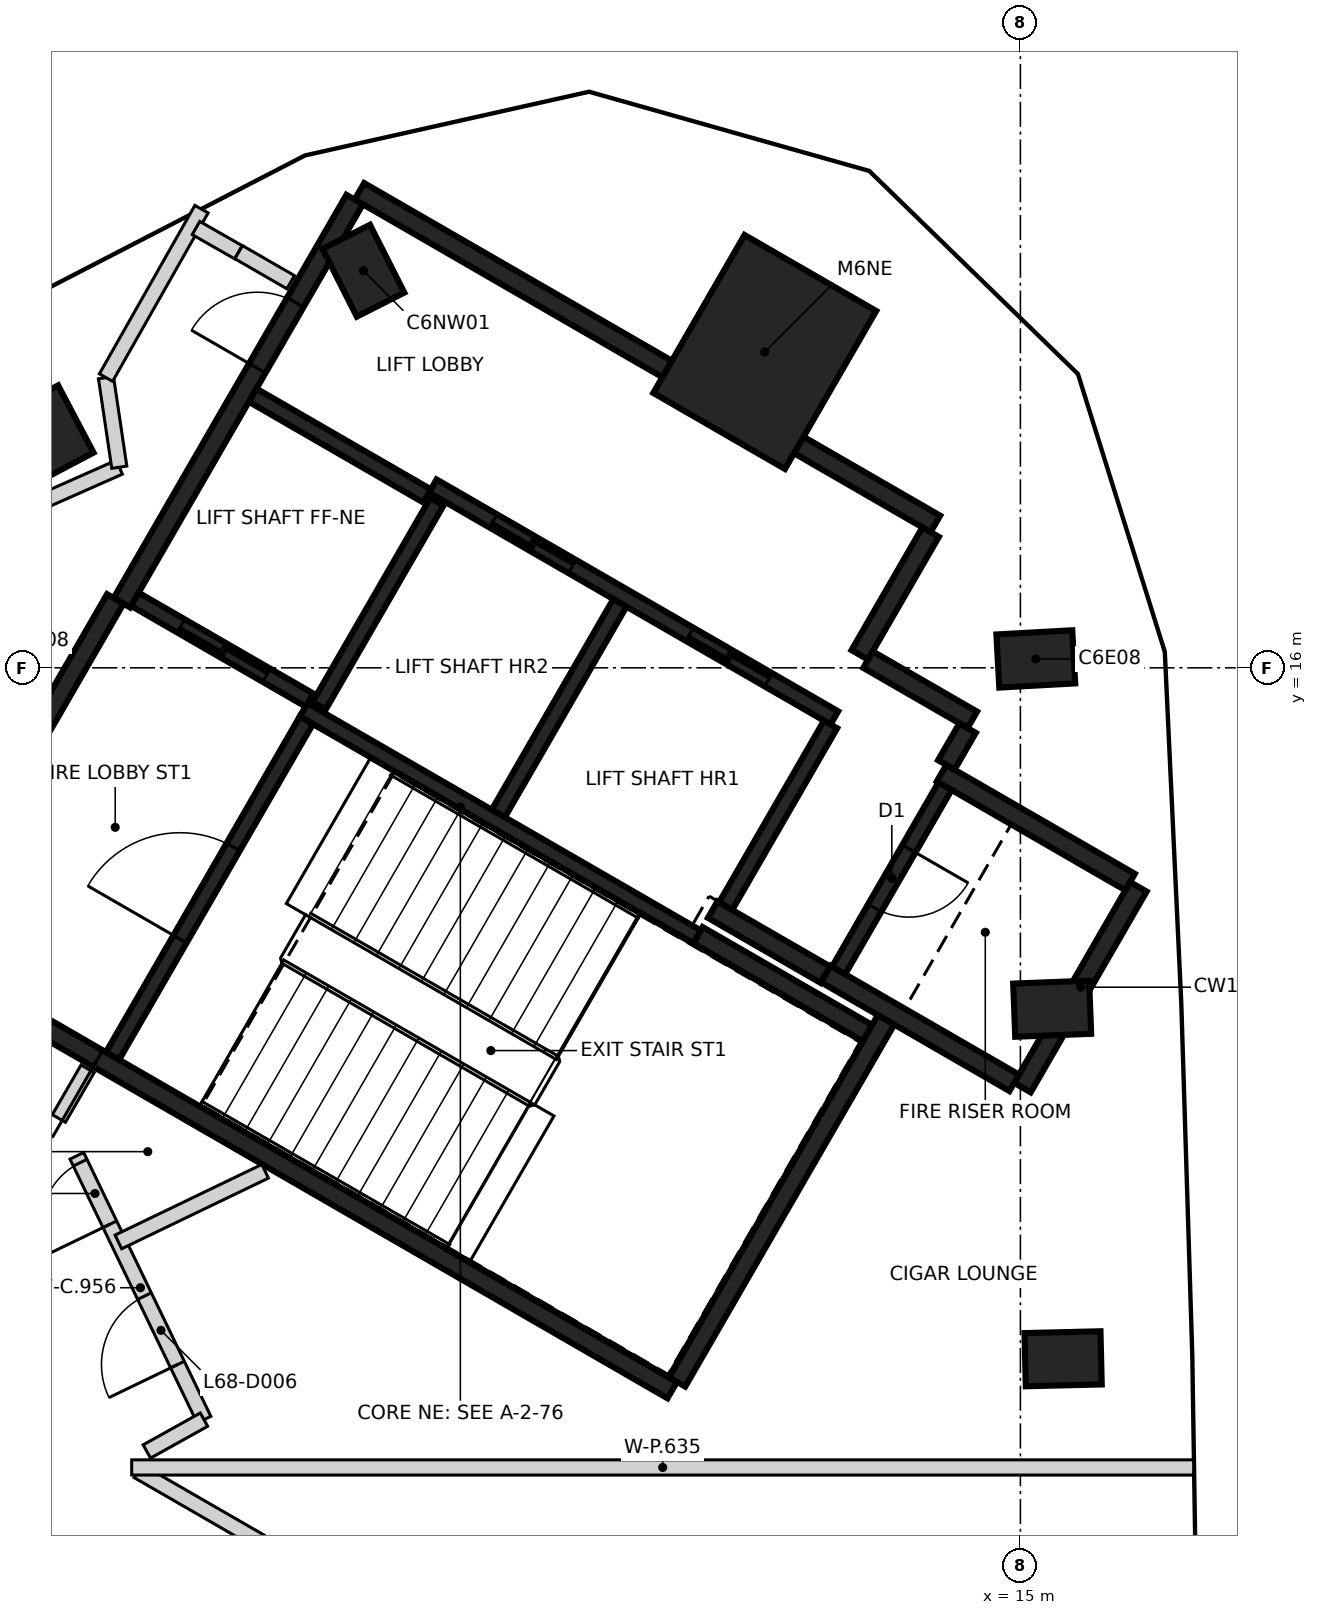
"""IFC4 building model, lengths in metres.
Left out: names, types, materials, properties, quantities, classifications, styles, units other than length and angle.
Written with IfcOpenShell. Run it as: python <this file> out.ifc"""

import sys

from ifc_helpers import new_model, si_unit, direction, frame, frame_2d, origin, origin_2d, place, context, subcontext, project, spatial, rectangle, extrude, element, fill, save


model = new_model("IFC4")
c1 = context("Model", 3, precision=1e-05, world=origin(), true_north=direction((0.0, 1.0)))
c2 = subcontext(c1, "Body", "Model", "MODEL_VIEW")
j1 = project(units=[si_unit("LENGTHUNIT", "METRE"), si_unit("PLANEANGLEUNIT", "RADIAN")], contexts=[c1])
p1 = place(None, origin())
s1 = spatial("IfcSite", under=j1, at=p1, CompositionType="ELEMENT")
p2 = place(p1, origin())
s2 = spatial("IfcBuilding", under=s1, at=p2, CompositionType="ELEMENT")
p3 = place(p2, frame((0.0, 0.0, 269.4)))
s3 = spatial("IfcBuildingStorey", under=s2, at=p3, CompositionType="ELEMENT", Elevation=269.4)
for number, where, z_axis, x_axis in (
    (1, (15.562, 6.91, -0.35), (0.0, 0.0, 1.0), (1.0, 0.024, 0.0)),
    (2, (15.418, 11.515, -0.35), (0.0, 0.0, 1.0), (0.999, 0.039, 0.0)),
    (3, (15.202, 16.117, -0.35), (0.0, 0.0, 1.0), (0.998, 0.055, 0.0)),
    (4, (6.356, 21.224, -0.35), (0.0, 0.0, 1.0), (-0.452, 0.892, 0.0)),
    (5, (2.263, 19.11, -0.35), (0.0, 0.0, 1.0), (-0.466, 0.885, 0.0)),
):
    element("IfcColumn", number, at=place(p3, frame(where, z_axis=z_axis, x_axis=x_axis)), inside=s3, PredefinedType="COLUMN", context=c2, shape_type="SweptSolid", body=[
        extrude(rectangle(XDim=1.0, YDim=0.7, at=origin_2d()), origin(), (0.0, 0.0, 1.0), 3.6),
    ])
p4 = place(p3, frame((11.637, 20.155, -0.35), z_axis=(0.0, 0.0, 1.0), x_axis=(0.5, 0.866025403784, 0.0)))
e6 = element("IfcColumn", 6, at=p4, inside=s3, PredefinedType="COLUMN", context=c2, shape_type="SweptSolid", body=[
    extrude(rectangle(XDim=2.4, YDim=2.0, at=origin_2d()), origin(), (0.0, 0.0, 1.0), 3.6),
])
p5 = place(p3, frame((10.42, 6.498, 0.0), z_axis=(0.0, 0.0, 1.0), x_axis=(-0.866021906294, 0.500006057782, 0.0)))
e7 = element("IfcWall", 7, at=p5, inside=s3, PredefinedType="SHEAR", context=c2, shape_type="SweptSolid", body=[
    extrude(rectangle(XDim=11.55, YDim=0.25, at=frame_2d((5.775, 0.0))), origin(), (0.0, 0.0, 1.0), 3.25),
])
p6 = place(p5, frame((10.025, 0.0, 0.0)))
e8 = element("IfcOpeningElement", 8, at=p6, cuts=e7, PredefinedType="OPENING", context=c2, shape_type="SweptSolid", body=[
    extrude(rectangle(XDim=1.2, YDim=2.1, at=frame_2d((0.6, 1.05))), frame((0.0, 0.135, 0.0), z_axis=(0.0, -1.0, 0.0), x_axis=(1.0, 0.0, 0.0)), (0.0, 0.0, 1.0), 0.27),
])
p7 = place(p5, frame((8.725, 0.0, 0.0)))
e9 = element("IfcOpeningElement", 9, at=p7, cuts=e7, PredefinedType="OPENING", context=c2, shape_type="SweptSolid", body=[
    extrude(rectangle(XDim=1.2, YDim=2.1, at=frame_2d((0.6, 1.05))), frame((0.0, 0.135, 0.0), z_axis=(0.0, -1.0, 0.0), x_axis=(1.0, 0.0, 0.0)), (0.0, 0.0, 1.0), 0.27),
])
p8 = place(p3, frame((6.304, 22.269, 0.0), z_axis=(0.0, 0.0, 1.0), x_axis=(0.866022959057, -0.500004234368, 0.0)))
e10 = element("IfcWall", 10, at=p8, inside=s3, PredefinedType="SHEAR", context=c2, shape_type="SweptSolid", body=[
    extrude(rectangle(XDim=8.75, YDim=0.25, at=frame_2d((4.375, 0.0))), origin(), (0.0, 0.0, 1.0), 3.25),
])
p9 = place(p3, frame((3.179, 16.856, 0.0), z_axis=(0.0, 0.0, 1.0), x_axis=(0.500001955336, 0.866024274868, 0.0)))
e11 = element("IfcWall", 11, at=p9, inside=s3, PredefinedType="SHEAR", context=c2, shape_type="SweptSolid", body=[
    extrude(rectangle(XDim=6.125, YDim=0.25, at=frame_2d((3.062, 0.0))), origin(), (0.0, 0.0, 1.0), 3.25),
])
p10 = place(p9, frame((3.563, 0.0, 0.0)))
e12 = element("IfcOpeningElement", 12, at=p10, cuts=e11, PredefinedType="OPENING", context=c2, shape_type="SweptSolid", body=[
    extrude(rectangle(XDim=1.0, YDim=2.1, at=frame_2d((0.5, 1.05))), frame((0.0, 0.135, 0.0), z_axis=(0.0, -1.0, 0.0), x_axis=(1.0, 0.0, 0.0)), (0.0, 0.0, 1.0), 0.27),
])
p11 = place(p3, frame((0.48, 12.381, 0.0), z_axis=(0.0, 0.0, 1.0), x_axis=(0.49999885962, 0.866026062182, 0.0)))
e13 = element("IfcWall", 13, at=p11, inside=s3, PredefinedType="SHEAR", context=c2, shape_type="SweptSolid", body=[
    extrude(rectangle(XDim=5.225, YDim=0.25, at=frame_2d((2.612, 0.0))), origin(), (0.0, 0.0, 1.0), 3.25),
])
p12 = place(p3, frame((13.238, 11.378, 0.0), z_axis=(0.0, 0.0, 1.0), x_axis=(-0.500008851346, -0.866020293397, 0.0)))
e14 = element("IfcWall", 14, at=p12, inside=s3, PredefinedType="SHEAR", context=c2, shape_type="SweptSolid", body=[
    extrude(rectangle(XDim=5.51, YDim=0.25, at=frame_2d((2.755, 0.0))), origin(), (0.0, 0.0, 1.0), 3.25),
])
p13 = place(p3, frame((16.552, 13.119, 0.0), z_axis=(0.0, 0.0, 1.0), x_axis=(-0.499978833458, -0.866037623948, 0.0)))
e15 = element("IfcWall", 15, at=p13, inside=s3, PredefinedType="SHEAR", context=c2, shape_type="SweptSolid", body=[
    extrude(rectangle(XDim=3.05, YDim=0.25, at=frame_2d((1.525, 0.0))), origin(), (0.0, 0.0, 1.0), 3.25),
])
p14 = place(p3, frame((14.918, 10.54, 0.0), z_axis=(0.0, 0.0, 1.0), x_axis=(-0.866063538972, 0.499933942099, 0.0)))
e16 = element("IfcWall", 16, at=p14, inside=s3, PredefinedType="SHEAR", context=c2, shape_type="SweptSolid", body=[
    extrude(rectangle(XDim=2.865, YDim=0.25, at=frame_2d((1.432, 0.0))), origin(), (0.0, 0.0, 1.0), 3.25),
])
p15 = place(p3, frame((13.963, 14.614, 0.0), z_axis=(0.0, 0.0, 1.0), x_axis=(0.866042235819, -0.499970844928, 0.0)))
e17 = element("IfcWall", 17, at=p15, inside=s3, PredefinedType="SHEAR", context=c2, shape_type="SweptSolid", body=[
    extrude(rectangle(XDim=2.865, YDim=0.25, at=frame_2d((1.432, 0.0))), origin(), (0.0, 0.0, 1.0), 3.25),
])
p16 = place(p3, frame((10.757, 12.481, 0.0), z_axis=(0.0, 0.0, 1.0), x_axis=(0.866022940537, -0.500004266446, 0.0)))
e18 = element("IfcWall", 18, at=p16, inside=s3, PredefinedType="SHEAR", context=c2, shape_type="SweptSolid", body=[
    extrude(rectangle(XDim=2.575, YDim=0.25, at=frame_2d((1.287, 0.0))), origin(), (0.0, 0.0, 1.0), 3.25),
])
p17 = place(p3, frame((13.819, 17.785, 0.0), z_axis=(0.0, 0.0, 1.0), x_axis=(-0.500039802285, -0.866002422705, 0.0)))
e19 = element("IfcWall", 19, at=p17, inside=s3, PredefinedType="SHEAR", context=c2, shape_type="SweptSolid", body=[
    extrude(rectangle(XDim=1.865, YDim=0.25, at=frame_2d((0.932, 0.0))), origin(), (0.0, 0.0, 1.0), 3.25),
])
p18 = place(p3, frame((12.433, 11.964, 0.0), z_axis=(0.0, 0.0, 1.0), x_axis=(-0.866038183914, 0.499977863513, 0.0)))
e20 = element("IfcWall", 20, at=p18, inside=s3, PredefinedType="SHEAR", context=c2, shape_type="SweptSolid", body=[
    extrude(rectangle(XDim=1.71, YDim=0.25, at=frame_2d((0.855, 0.0))), origin(), (0.0, 0.0, 1.0), 3.25),
])
p19 = place(p3, frame((12.995, 16.108, 0.0), z_axis=(0.0, 0.0, 1.0), x_axis=(0.866044474677, -0.49996696679, 0.0)))
e21 = element("IfcWall", 21, at=p19, inside=s3, PredefinedType="SHEAR", context=c2, shape_type="SweptSolid", body=[
    extrude(rectangle(XDim=1.584, YDim=0.25, at=frame_2d((0.792, 0.0))), origin(), (0.0, 0.0, 1.0), 3.25),
])
p20 = place(p3, frame((14.305, 15.207, 0.0), z_axis=(0.0, 0.0, 1.0), x_axis=(-0.499848422343, -0.866112899501, 0.0)))
e22 = element("IfcWall", 22, at=p20, inside=s3, PredefinedType="SHEAR", context=c2, shape_type="SweptSolid", body=[
    extrude(rectangle(XDim=0.559, YDim=0.25, at=frame_2d((0.28, 0.0))), origin(), (0.0, 0.0, 1.0), 3.25),
])
p21 = place(p3, frame((12.552, 15.342, 0.0), z_axis=(0.0, 0.0, 1.0), x_axis=(-0.866030299012, 0.499991521122, 0.0)))
e23 = element("IfcWall", 23, at=p21, inside=s3, PredefinedType="SHEAR", context=c2, shape_type="SweptSolid", body=[
    extrude(rectangle(XDim=6.1, YDim=0.2, at=frame_2d((3.05, 0.0))), origin(), (0.0, 0.0, 1.0), 3.25),
])
p22 = place(p21, frame((1.0, 0.0, 0.0)))
e24 = element("IfcOpeningElement", 24, at=p22, cuts=e23, PredefinedType="OPENING", context=c2, shape_type="SweptSolid", body=[
    extrude(rectangle(XDim=1.2, YDim=2.1, at=frame_2d((0.6, 1.05))), frame((0.0, 0.11, 0.0), z_axis=(0.0, -1.0, 0.0), x_axis=(1.0, 0.0, 0.0)), (0.0, 0.0, 1.0), 0.22),
])
p23 = place(p21, frame((3.982, 0.0, 0.0)))
e25 = element("IfcOpeningElement", 25, at=p23, cuts=e23, PredefinedType="OPENING", context=c2, shape_type="SweptSolid", body=[
    extrude(rectangle(XDim=1.2, YDim=2.1, at=frame_2d((0.6, 1.05))), frame((0.0, 0.11, 0.0), z_axis=(0.0, -1.0, 0.0), x_axis=(1.0, 0.0, 0.0)), (0.0, 0.0, 1.0), 0.22),
])
p24 = place(p3, frame((10.743, 12.46, 0.0), z_axis=(0.0, 0.0, 1.0), x_axis=(-0.866018848283, 0.500011354289, 0.0)))
e26 = element("IfcWall", 26, at=p24, inside=s3, PredefinedType="SHEAR", context=c2, shape_type="SweptSolid", body=[
    extrude(rectangle(XDim=5.974, YDim=0.2, at=frame_2d((2.987, 0.0))), origin(), (0.0, 0.0, 1.0), 3.25),
])
p25 = place(p3, frame((3.057, 10.895, 0.0), z_axis=(0.0, 0.0, 1.0), x_axis=(0.500027839223, 0.866009330205, 0.0)))
e27 = element("IfcWall", 27, at=p25, inside=s3, PredefinedType="SHEAR", context=c2, shape_type="SweptSolid", body=[
    extrude(rectangle(XDim=5.098, YDim=0.2, at=frame_2d((2.549, 0.0))), origin(), (0.0, 0.0, 1.0), 3.25),
])
p26 = place(p25, frame((1.774, 0.0, 0.0)))
e28 = element("IfcOpeningElement", 28, at=p26, cuts=e27, PredefinedType="OPENING", context=c2, shape_type="SweptSolid", body=[
    extrude(rectangle(XDim=1.4, YDim=2.1, at=frame_2d((0.7, 1.05))), frame((0.0, 0.11, 0.0), z_axis=(0.0, -1.0, 0.0), x_axis=(1.0, 0.0, 0.0)), (0.0, 0.0, 1.0), 0.22),
])
p27 = place(p3, frame((8.132, 14.084, 0.0), z_axis=(0.0, 0.0, 1.0), x_axis=(0.500030834389, 0.86600760081, 0.0)))
e29 = element("IfcWall", 29, at=p27, inside=s3, PredefinedType="SHEAR", context=c2, shape_type="SweptSolid", body=[
    extrude(rectangle(XDim=3.198, YDim=0.2, at=frame_2d((1.599, 0.0))), origin(), (0.0, 0.0, 1.0), 3.25),
])
p28 = place(p3, frame((14.008, 14.442, 0.0), z_axis=(0.0, 0.0, 1.0), x_axis=(-0.499986818241, -0.866033014143, 0.0)))
e30 = element("IfcWall", 30, at=p28, inside=s3, PredefinedType="SHEAR", context=c2, shape_type="SweptSolid", body=[
    extrude(rectangle(XDim=2.798, YDim=0.2, at=frame_2d((1.399, 0.0))), origin(), (0.0, 0.0, 1.0), 3.25),
])
p29 = place(p28, frame((0.949, 0.0, 0.0)))
e31 = element("IfcOpeningElement", 31, at=p29, cuts=e30, PredefinedType="OPENING", context=c2, shape_type="SweptSolid", body=[
    extrude(rectangle(XDim=0.9, YDim=2.1, at=frame_2d((0.45, 1.05))), frame((0.0, 0.11, 0.0), z_axis=(0.0, -1.0, 0.0), x_axis=(1.0, 0.0, 0.0)), (0.0, 0.0, 1.0), 0.22),
])
p30 = place(p3, frame((12.502, 15.255, 0.0), z_axis=(0.0, 0.0, 1.0), x_axis=(-0.499965018551, -0.866045599391, 0.0)))
e32 = element("IfcWall", 32, at=p30, inside=s3, PredefinedType="SHEAR", context=c2, shape_type="SweptSolid", body=[
    extrude(rectangle(XDim=2.759, YDim=0.2, at=frame_2d((1.379, 0.0))), origin(), (0.0, 0.0, 1.0), 3.25),
])
p31 = place(p3, frame((7.324, 18.187, 0.0), z_axis=(0.0, 0.0, 1.0), x_axis=(-0.499967891604, -0.866043940782, 0.0)))
e33 = element("IfcWall", 33, at=p31, inside=s3, PredefinedType="SHEAR", context=c2, shape_type="SweptSolid", body=[
    extrude(rectangle(XDim=3.1, YDim=0.2, at=frame_2d((1.55, 0.0))), origin(), (0.0, 0.0, 1.0), 3.25),
])
p32 = place(p3, frame((5.646, 15.576, 0.0), z_axis=(0.0, 0.0, 1.0), x_axis=(-0.866018407898, 0.500012117035, 0.0)))
e34 = element("IfcWall", 34, at=p32, inside=s3, PredefinedType="SHEAR", context=c2, shape_type="SweptSolid", body=[
    extrude(rectangle(XDim=2.651, YDim=0.2, at=frame_2d((1.325, 0.0))), origin(), (0.0, 0.0, 1.0), 3.25),
])
p33 = place(p32, frame((0.652, 0.0, 0.0)))
e35 = element("IfcOpeningElement", 35, at=p33, cuts=e34, PredefinedType="OPENING", context=c2, shape_type="SweptSolid", body=[
    extrude(rectangle(XDim=1.3, YDim=2.1, at=frame_2d((0.65, 1.05))), frame((0.0, 0.11, 0.0), z_axis=(0.0, -1.0, 0.0), x_axis=(1.0, 0.0, 0.0)), (0.0, 0.0, 1.0), 0.22),
])
p34 = place(p3, frame((7.196, 18.26, 0.0), z_axis=(0.0, 0.0, 1.0), x_axis=(-0.866018407898, 0.500012117035, 0.0)))
e36 = element("IfcWall", 36, at=p34, inside=s3, PredefinedType="SHEAR", context=c2, shape_type="SweptSolid", body=[
    extrude(rectangle(XDim=2.651, YDim=0.2, at=frame_2d((1.325, 0.0))), origin(), (0.0, 0.0, 1.0), 3.25),
])
p35 = place(p3, frame((2.021, 18.141, 0.0), z_axis=(0.0, 0.0, 1.0), x_axis=(0.914343087003, 0.404940389748, 0.0)))
e37 = element("IfcWall", 37, at=p35, inside=s3, PredefinedType="PARTITIONING", context=c2, shape_type="SweptSolid", body=[
    extrude(rectangle(XDim=1.229, YDim=0.2, at=frame_2d((0.615, 0.0))), origin(), (0.0, 0.0, 1.0), 3.25),
])
p36 = place(p3, frame((2.35, 10.071, 0.0), z_axis=(0.0, 0.0, 1.0), x_axis=(0.500309905322, 0.865846405916, 0.0)))
e38 = element("IfcWall", 38, at=p36, inside=s3, PredefinedType="PARTITIONING", context=c2, shape_type="SweptSolid", body=[
    extrude(rectangle(XDim=0.755, YDim=0.2, at=frame_2d((0.378, 0.0))), origin(), (0.0, 0.0, 1.0), 3.25),
])
p37 = place(p3, frame((4.26, 6.109, 0.0), z_axis=(0.0, 0.0, 1.0), x_axis=(-0.434189007872, 0.900821794498, 0.0)))
e39 = element("IfcWall", 39, at=p37, inside=s3, PredefinedType="PARTITIONING", context=c2, shape_type="SweptSolid", body=[
    extrude(rectangle(XDim=3.853, YDim=0.2, at=frame_2d((1.926, 0.0))), origin(), (0.0, 0.0, 1.0), 3.25),
])
p38 = place(p37, frame((2.853, 0.0, 0.0)))
e40 = element("IfcOpeningElement", 40, at=p38, cuts=e39, PredefinedType="OPENING", context=c2, shape_type="SweptSolid", body=[
    extrude(rectangle(XDim=0.9, YDim=2.1, at=frame_2d((0.45, 1.05))), frame((0.0, 0.11, 0.0), z_axis=(0.0, -1.0, 0.0), x_axis=(1.0, 0.0, 0.0)), (0.0, 0.0, 1.0), 0.22),
])
p39 = place(p37, frame((0.804, 0.0, 0.0)))
e41 = element("IfcOpeningElement", 41, at=p39, cuts=e39, PredefinedType="OPENING", context=c2, shape_type="SweptSolid", body=[
    extrude(rectangle(XDim=1.0, YDim=2.1, at=frame_2d((0.5, 1.05))), frame((0.0, 0.11, 0.0), z_axis=(0.0, -1.0, 0.0), x_axis=(1.0, 0.0, 0.0)), (0.0, 0.0, 1.0), 0.22),
])
p40 = place(p3, frame((2.97, 19.817, 0.0), z_axis=(0.0, 0.0, 1.0), x_axis=(0.146986994932, -0.989138424752, 0.0)))
e42 = element("IfcWall", 42, at=p40, inside=s3, PredefinedType="PARTITIONING", context=c2, shape_type="SweptSolid", body=[
    extrude(rectangle(XDim=1.191, YDim=0.2, at=frame_2d((0.595, 0.0))), origin(), (0.0, 0.0, 1.0), 2.35),
])
p41 = place(p3, frame((2.97, 19.818, 0.0), z_axis=(0.0, 0.0, 1.0), x_axis=(0.493215654548, 0.86990707441, 0.0)))
e43 = element("IfcWall", 43, at=p41, inside=s3, PredefinedType="PARTITIONING", context=c2, shape_type="SweptSolid", body=[
    extrude(rectangle(XDim=2.548, YDim=0.2, at=frame_2d((1.274, 0.0))), origin(), (0.0, 0.0, 1.0), 3.25),
])
p42 = place(p3, frame((3.39, 5.433, 0.0), z_axis=(0.0, 0.0, 1.0), x_axis=(0.866117799835, -0.499839931186, 0.0)))
e44 = element("IfcWall", 44, at=p42, inside=s3, PredefinedType="PARTITIONING", context=c2, shape_type="SweptSolid", body=[
    extrude(rectangle(XDim=1.859, YDim=0.2, at=frame_2d((0.929, 0.0))), origin(), (0.0, 0.0, 1.0), 3.25),
])
p43 = place(p3, frame((3.507, 5.69, 0.0), z_axis=(0.0, 0.0, 1.0), x_axis=(0.873567976284, 0.486702158215, 0.0)))
e45 = element("IfcWall", 45, at=p43, inside=s3, PredefinedType="PARTITIONING", context=c2, shape_type="SweptSolid", body=[
    extrude(rectangle(XDim=0.861, YDim=0.2, at=frame_2d((0.43, 0.0))), origin(), (0.0, 0.0, 1.0), 3.25),
])
p44 = place(p3, frame((4.154, 21.786, 0.0), z_axis=(0.0, 0.0, 1.0), x_axis=(0.868196374619, -0.496220772539, 0.0)))
e46 = element("IfcWall", 46, at=p44, inside=s3, PredefinedType="PARTITIONING", context=c2, shape_type="SweptSolid", body=[
    extrude(rectangle(XDim=0.643, YDim=0.2, at=frame_2d((0.321, 0.0))), origin(), (0.0, 0.0, 1.0), 3.25),
])
p45 = place(p3, frame((4.716, 21.468, 0.0), z_axis=(0.0, 0.0, 1.0), x_axis=(0.865912682783, -0.500195187698, 0.0)))
e47 = element("IfcWall", 47, at=p45, inside=s3, PredefinedType="PARTITIONING", context=c2, shape_type="SweptSolid", body=[
    extrude(rectangle(XDim=0.79, YDim=0.2, at=frame_2d((0.395, 0.0))), origin(), (0.0, 0.0, 1.0), 3.25),
])
p46 = place(p3, frame((3.133, 8.447, 0.0), z_axis=(0.0, 0.0, 1.0), x_axis=(0.900981876458, 0.433856725538, 0.0)))
e48 = element("IfcWall", 48, at=p46, inside=s3, PredefinedType="PARTITIONING", context=c2, shape_type="SweptSolid", body=[
    extrude(rectangle(XDim=2.143, YDim=0.2, at=frame_2d((1.071, 0.0))), origin(), (0.0, 0.0, 1.0), 3.25),
])
p47 = place(p3, frame((3.308, 5.48, 0.0), z_axis=(0.0, 0.0, 1.0), x_axis=(1.0, 0.0, 0.0)))
e49 = element("IfcWall", 49, at=p47, inside=s3, PredefinedType="PARTITIONING", context=c2, shape_type="SweptSolid", body=[
    extrude(rectangle(XDim=13.971, YDim=0.2, at=frame_2d((6.986, 0.0))), origin(), (0.0, 0.0, 1.0), 2.35),
])
p48 = place(p33, origin())
e50 = element("IfcDoor", 50, at=p48, inside=s3, OperationType="SLIDING_TO_LEFT", PredefinedType="DOOR", context=c2, shape_type="SweptSolid", body=[
    extrude(rectangle(XDim=1.3, YDim=2.1, at=frame_2d((0.65, 1.05))), frame((0.0, 0.025, 0.0), z_axis=(0.0, -1.0, 0.0), x_axis=(1.0, 0.0, 0.0)), (0.0, 0.0, 1.0), 0.05),
])
fill(e35, e50)
p49 = place(p22, origin())
e51 = element("IfcDoor", 51, at=p49, inside=s3, OperationType="DOUBLE_DOOR_SLIDING", PredefinedType="DOOR", context=c2, shape_type="SweptSolid", body=[
    extrude(rectangle(XDim=1.2, YDim=2.1, at=frame_2d((0.6, 1.05))), frame((0.0, 0.025, 0.0), z_axis=(0.0, -1.0, 0.0), x_axis=(1.0, 0.0, 0.0)), (0.0, 0.0, 1.0), 0.05),
])
fill(e24, e51)
p50 = place(p23, origin())
e52 = element("IfcDoor", 52, at=p50, inside=s3, OperationType="DOUBLE_DOOR_SLIDING", PredefinedType="DOOR", context=c2, shape_type="SweptSolid", body=[
    extrude(rectangle(XDim=1.2, YDim=2.1, at=frame_2d((0.6, 1.05))), frame((0.0, 0.025, 0.0), z_axis=(0.0, -1.0, 0.0), x_axis=(1.0, 0.0, 0.0)), (0.0, 0.0, 1.0), 0.05),
])
fill(e25, e52)
p51 = place(p10, origin())
e53 = element("IfcDoor", 53, at=p51, inside=s3, OperationType="SINGLE_SWING_LEFT", PredefinedType="DOOR", context=c2, shape_type="SweptSolid", body=[
    extrude(rectangle(XDim=1.0, YDim=2.1, at=frame_2d((0.5, 1.05))), frame((0.0, 0.025, 0.0), z_axis=(0.0, -1.0, 0.0), x_axis=(1.0, 0.0, 0.0)), (0.0, 0.0, 1.0), 0.05),
])
fill(e12, e53)
p52 = place(p7, origin())
e54 = element("IfcDoor", 54, at=p52, inside=s3, OperationType="SINGLE_SWING_RIGHT", PredefinedType="DOOR", context=c2, shape_type="SweptSolid", body=[
    extrude(rectangle(XDim=1.2, YDim=2.1, at=frame_2d((0.6, 1.05))), frame((0.0, 0.025, 0.0), z_axis=(0.0, -1.0, 0.0), x_axis=(1.0, 0.0, 0.0)), (0.0, 0.0, 1.0), 0.05),
])
fill(e9, e54)
p53 = place(p26, origin())
e55 = element("IfcDoor", 55, at=p53, inside=s3, OperationType="SINGLE_SWING_LEFT", PredefinedType="DOOR", context=c2, shape_type="SweptSolid", body=[
    extrude(rectangle(XDim=1.4, YDim=2.1, at=frame_2d((0.7, 1.05))), frame((0.0, 0.025, 0.0), z_axis=(0.0, -1.0, 0.0), x_axis=(1.0, 0.0, 0.0)), (0.0, 0.0, 1.0), 0.05),
])
fill(e28, e55)
p54 = place(p29, origin())
e56 = element("IfcDoor", 56, at=p54, inside=s3, OperationType="SINGLE_SWING_RIGHT", PredefinedType="DOOR", context=c2, shape_type="SweptSolid", body=[
    extrude(rectangle(XDim=0.9, YDim=2.1, at=frame_2d((0.45, 1.05))), frame((0.0, 0.025, 0.0), z_axis=(0.0, -1.0, 0.0), x_axis=(1.0, 0.0, 0.0)), (0.0, 0.0, 1.0), 0.05),
])
fill(e31, e56)
p55 = place(p38, origin())
e57 = element("IfcDoor", 57, at=p55, inside=s3, OperationType="SINGLE_SWING_LEFT", PredefinedType="DOOR", context=c2, shape_type="SweptSolid", body=[
    extrude(rectangle(XDim=0.9, YDim=2.1, at=frame_2d((0.45, 1.05))), frame((0.0, 0.025, 0.0), z_axis=(0.0, -1.0, 0.0), x_axis=(1.0, 0.0, 0.0)), (0.0, 0.0, 1.0), 0.05),
])
fill(e40, e57)
p56 = place(p39, origin())
e58 = element("IfcDoor", 58, at=p56, inside=s3, OperationType="SINGLE_SWING_LEFT", PredefinedType="DOOR", context=c2, shape_type="SweptSolid", body=[
    extrude(rectangle(XDim=1.0, YDim=2.1, at=frame_2d((0.5, 1.05))), frame((0.0, 0.025, 0.0), z_axis=(0.0, -1.0, 0.0), x_axis=(1.0, 0.0, 0.0)), (0.0, 0.0, 1.0), 0.05),
])
fill(e41, e58)
save(model, sys.argv[1])
